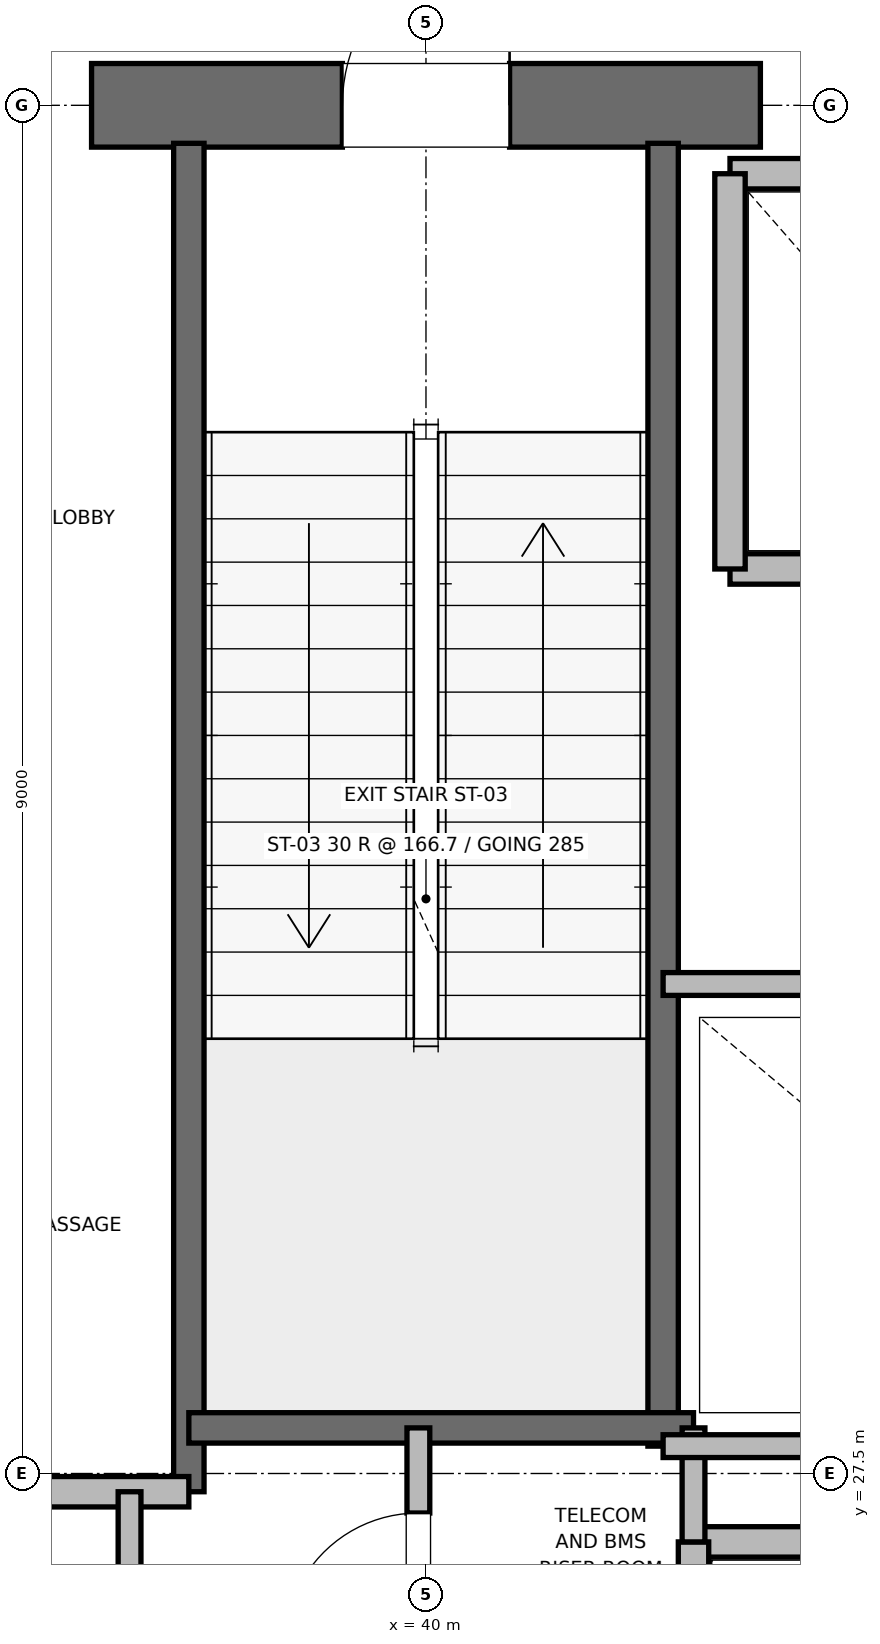
"""IFC4 building model, lengths in metres.
Left out: names, types, materials, properties, quantities, classifications, styles, units other than length and angle.
Written with IfcOpenShell. Run it as: python <this file> out.ifc"""

import sys

from ifc_helpers import new_model, si_unit, direction, frame, frame_2d, origin, place, context, subcontext, project, spatial, rectangle, extrude, element, fill, save


model = new_model("IFC4")
c1 = context("Model", 3, precision=1e-05, world=origin(), true_north=direction((0.0, 1.0)))
c2 = subcontext(c1, "Body", "Model", "MODEL_VIEW")
j1 = project(units=[si_unit("LENGTHUNIT", "METRE"), si_unit("PLANEANGLEUNIT", "RADIAN")], contexts=[c1])
p1 = place(None, origin())
s1 = spatial("IfcSite", under=j1, at=p1, CompositionType="ELEMENT")
p2 = place(p1, origin())
s2 = spatial("IfcBuilding", under=s1, at=p2, CompositionType="ELEMENT")
p3 = place(p2, frame((0.0, 0.0, 200.2)))
s3 = spatial("IfcBuildingStorey", under=s2, at=p3, CompositionType="ELEMENT", Elevation=200.2)
p4 = place(p3, frame((37.8, 36.5, 0.0), z_axis=(0.0, 0.0, 1.0), x_axis=(1.0, 0.0, 0.0)))
e1 = element("IfcWall", 1, at=p4, inside=s3, PredefinedType="SHEAR", context=c2, shape_type="SweptSolid", body=[
    extrude(rectangle(XDim=4.4, YDim=0.55, at=frame_2d((2.2, 0.0))), origin(), (0.0, 0.0, 1.0), 4.775),
])
p5 = place(p4, frame((1.65, 0.0, 0.0)))
e2 = element("IfcOpeningElement", 2, at=p5, cuts=e1, PredefinedType="OPENING", context=c2, shape_type="SweptSolid", body=[
    extrude(rectangle(XDim=1.1, YDim=2.15, at=frame_2d((0.55, 1.075))), frame((0.0, 0.275, 0.0), z_axis=(0.0, -1.0, 0.0), x_axis=(1.0, 0.0, 0.0)), (0.0, 0.0, 1.0), 0.55),
])
p6 = place(p3, frame((38.44, 27.38, 0.0), z_axis=(0.0, 0.0, 1.0), x_axis=(0.0, 1.0, 0.0)))
e3 = element("IfcWall", 3, at=p6, inside=s3, PredefinedType="SOLIDWALL", context=c2, shape_type="SweptSolid", body=[
    extrude(rectangle(XDim=8.87, YDim=0.2, at=frame_2d((4.435, 0.0))), origin(), (0.0, 0.0, 1.0), 4.775),
])
p7 = place(p3, frame((41.56, 27.68, 0.0), z_axis=(0.0, 0.0, 1.0), x_axis=(0.0, 1.0, 0.0)))
e4 = element("IfcWall", 4, at=p7, inside=s3, PredefinedType="SOLIDWALL", context=c2, shape_type="SweptSolid", body=[
    extrude(rectangle(XDim=8.57, YDim=0.2, at=frame_2d((4.285, 0.0))), origin(), (0.0, 0.0, 1.0), 4.775),
])
p8 = place(p3, frame((38.44, 27.8, 0.0), z_axis=(0.0, 0.0, 1.0), x_axis=(1.0, 0.0, 0.0)))
e5 = element("IfcWall", 5, at=p8, inside=s3, PredefinedType="SOLIDWALL", context=c2, shape_type="SweptSolid", body=[
    extrude(rectangle(XDim=3.32, YDim=0.2, at=frame_2d((1.66, 0.0))), origin(), (0.0, 0.0, 1.0), 4.775),
])
p9 = place(p3, frame((32.82, 27.38, 0.0), z_axis=(0.0, 0.0, 1.0), x_axis=(1.0, 0.0, 0.0)))
e6 = element("IfcWall", 6, at=p9, inside=s3, PredefinedType="PARTITIONING", context=c2, shape_type="SweptSolid", body=[
    extrude(rectangle(XDim=5.62, YDim=0.2, at=frame_2d((2.81, 0.0))), origin(), (0.0, 0.0, 1.0), 4.775),
])
p10 = place(p3, frame((43.44, 27.05, 0.0), z_axis=(0.0, 0.0, 1.0), x_axis=(-1.0, 0.0, 0.0)))
e7 = element("IfcWall", 7, at=p10, inside=s3, PredefinedType="SOLIDWALL", context=c2, shape_type="SweptSolid", body=[
    extrude(rectangle(XDim=1.68, YDim=0.2, at=frame_2d((0.84, 0.0))), origin(), (0.0, 0.0, 1.0), 4.775),
])
p11 = place(p3, frame((41.76, 27.05, 0.0), z_axis=(0.0, 0.0, 1.0), x_axis=(0.0, -1.0, 0.0)))
e8 = element("IfcWall", 8, at=p11, inside=s3, PredefinedType="SOLIDWALL", context=c2, shape_type="SweptSolid", body=[
    extrude(rectangle(XDim=2.6, YDim=0.2, at=frame_2d((1.3, 0.0))), origin(), (0.0, 0.0, 1.0), 4.775),
])
p12 = place(p3, frame((42.0, 33.45, 0.0), z_axis=(0.0, 0.0, 1.0), x_axis=(1.0, 0.0, 0.0)))
e9 = element("IfcWall", 9, at=p12, inside=s3, PredefinedType="SOLIDWALL", context=c2, shape_type="SweptSolid", body=[
    extrude(rectangle(XDim=2.3, YDim=0.2, at=frame_2d((1.15, 0.0))), origin(), (0.0, 0.0, 1.0), 4.775),
])
p13 = place(p3, frame((44.3, 36.05, 0.0), z_axis=(0.0, 0.0, 1.0), x_axis=(-1.0, 0.0, 0.0)))
e10 = element("IfcWall", 10, at=p13, inside=s3, PredefinedType="SOLIDWALL", context=c2, shape_type="SweptSolid", body=[
    extrude(rectangle(XDim=2.3, YDim=0.2, at=frame_2d((1.15, 0.0))), origin(), (0.0, 0.0, 1.0), 3.755),
])
p14 = place(p3, frame((42.0, 36.05, 0.0), z_axis=(0.0, 0.0, 1.0), x_axis=(0.0, -1.0, 0.0)))
e11 = element("IfcWall", 11, at=p14, inside=s3, PredefinedType="SOLIDWALL", context=c2, shape_type="SweptSolid", body=[
    extrude(rectangle(XDim=2.6, YDim=0.2, at=frame_2d((1.3, 0.0))), origin(), (0.0, 0.0, 1.0), 3.755),
])
p15 = place(p3, frame((41.76, 27.05, 0.0), z_axis=(0.0, 0.0, 1.0), x_axis=(0.0, 1.0, 0.0)))
e12 = element("IfcWall", 12, at=p15, inside=s3, PredefinedType="PARTITIONING", context=c2, shape_type="SweptSolid", body=[
    extrude(rectangle(XDim=0.75, YDim=0.15, at=frame_2d((0.375, 0.0))), origin(), (0.0, 0.0, 1.0), 2.85),
])
p16 = place(p3, frame((39.95, 25.8, 0.0), z_axis=(0.0, 0.0, 1.0), x_axis=(0.0, 1.0, 0.0)))
e13 = element("IfcWall", 13, at=p16, inside=s3, PredefinedType="PARTITIONING", context=c2, shape_type="SweptSolid", body=[
    extrude(rectangle(XDim=2.0, YDim=0.15, at=frame_2d((1.0, 0.0))), origin(), (0.0, 0.0, 1.0), 2.85),
])
p17 = place(p16, frame((0.56, 0.0, 0.0)))
e14 = element("IfcOpeningElement", 14, at=p17, cuts=e13, PredefinedType="OPENING", context=c2, shape_type="SweptSolid", body=[
    extrude(rectangle(XDim=0.88, YDim=2.1, at=frame_2d((0.44, 1.05))), frame((0.0, 0.075, 0.0), z_axis=(0.0, -1.0, 0.0), x_axis=(1.0, 0.0, 0.0)), (0.0, 0.0, 1.0), 0.15),
])
p18 = place(p3, frame((38.05, 18.6, 0.0), z_axis=(0.0, 0.0, 1.0), x_axis=(0.0, 1.0, 0.0)))
e15 = element("IfcWall", 15, at=p18, inside=s3, PredefinedType="PARTITIONING", context=c2, shape_type="SweptSolid", body=[
    extrude(rectangle(XDim=8.78, YDim=0.15, at=frame_2d((4.39, 0.0))), origin(), (0.0, 0.0, 1.0), 2.85),
])
p19 = place(p18, frame((3.89, 0.0, 0.0)))
e16 = element("IfcOpeningElement", 16, at=p19, cuts=e15, PredefinedType="OPENING", context=c2, shape_type="SweptSolid", body=[
    extrude(rectangle(XDim=1.0, YDim=2.15, at=frame_2d((0.5, 1.075))), frame((0.0, 0.075, 0.0), z_axis=(0.0, -1.0, 0.0), x_axis=(1.0, 0.0, 0.0)), (0.0, 0.0, 1.0), 0.15),
])
p20 = place(p3, frame((41.56, 27.68, 0.0), z_axis=(0.0, 0.0, 1.0), x_axis=(1.0, 0.0, 0.0)))
e17 = element("IfcWall", 17, at=p20, inside=s3, PredefinedType="PARTITIONING", context=c2, shape_type="SweptSolid", body=[
    extrude(rectangle(XDim=3.59, YDim=0.15, at=frame_2d((1.795, 0.0))), origin(), (0.0, 0.0, 1.0), 2.85),
])
p21 = place(p3, frame((41.56, 30.72, 0.0), z_axis=(0.0, 0.0, 1.0), x_axis=(1.0, 0.0, 0.0)))
e18 = element("IfcWall", 18, at=p21, inside=s3, PredefinedType="PARTITIONING", context=c2, shape_type="SweptSolid", body=[
    extrude(rectangle(XDim=3.59, YDim=0.15, at=frame_2d((1.795, 0.0))), origin(), (0.0, 0.0, 1.0), 2.85),
])
p22 = place(p21, frame((1.355, 0.0, 0.0)))
e19 = element("IfcOpeningElement", 19, at=p22, cuts=e18, PredefinedType="OPENING", context=c2, shape_type="SweptSolid", body=[
    extrude(rectangle(XDim=0.88, YDim=2.1, at=frame_2d((0.44, 1.05))), frame((0.0, 0.075, 0.0), z_axis=(0.0, -1.0, 0.0), x_axis=(1.0, 0.0, 0.0)), (0.0, 0.0, 1.0), 0.15),
])
p23 = place(p5, origin())
e20 = element("IfcDoor", 20, at=p23, inside=s3, OperationType="SINGLE_SWING_RIGHT", PredefinedType="DOOR", context=c2, shape_type="SweptSolid", body=[
    extrude(rectangle(XDim=1.1, YDim=2.15, at=frame_2d((0.55, 1.075))), frame((0.0, 0.025, 0.0), z_axis=(0.0, -1.0, 0.0), x_axis=(1.0, 0.0, 0.0)), (0.0, 0.0, 1.0), 0.05),
])
fill(e2, e20)
p24 = place(p17, origin())
e21 = element("IfcDoor", 21, at=p24, inside=s3, OperationType="SINGLE_SWING_LEFT", PredefinedType="DOOR", context=c2, shape_type="SweptSolid", body=[
    extrude(rectangle(XDim=0.88, YDim=2.1, at=frame_2d((0.44, 1.05))), frame((0.0, 0.025, 0.0), z_axis=(0.0, -1.0, 0.0), x_axis=(1.0, 0.0, 0.0)), (0.0, 0.0, 1.0), 0.05),
])
fill(e14, e21)
save(model, sys.argv[1])
